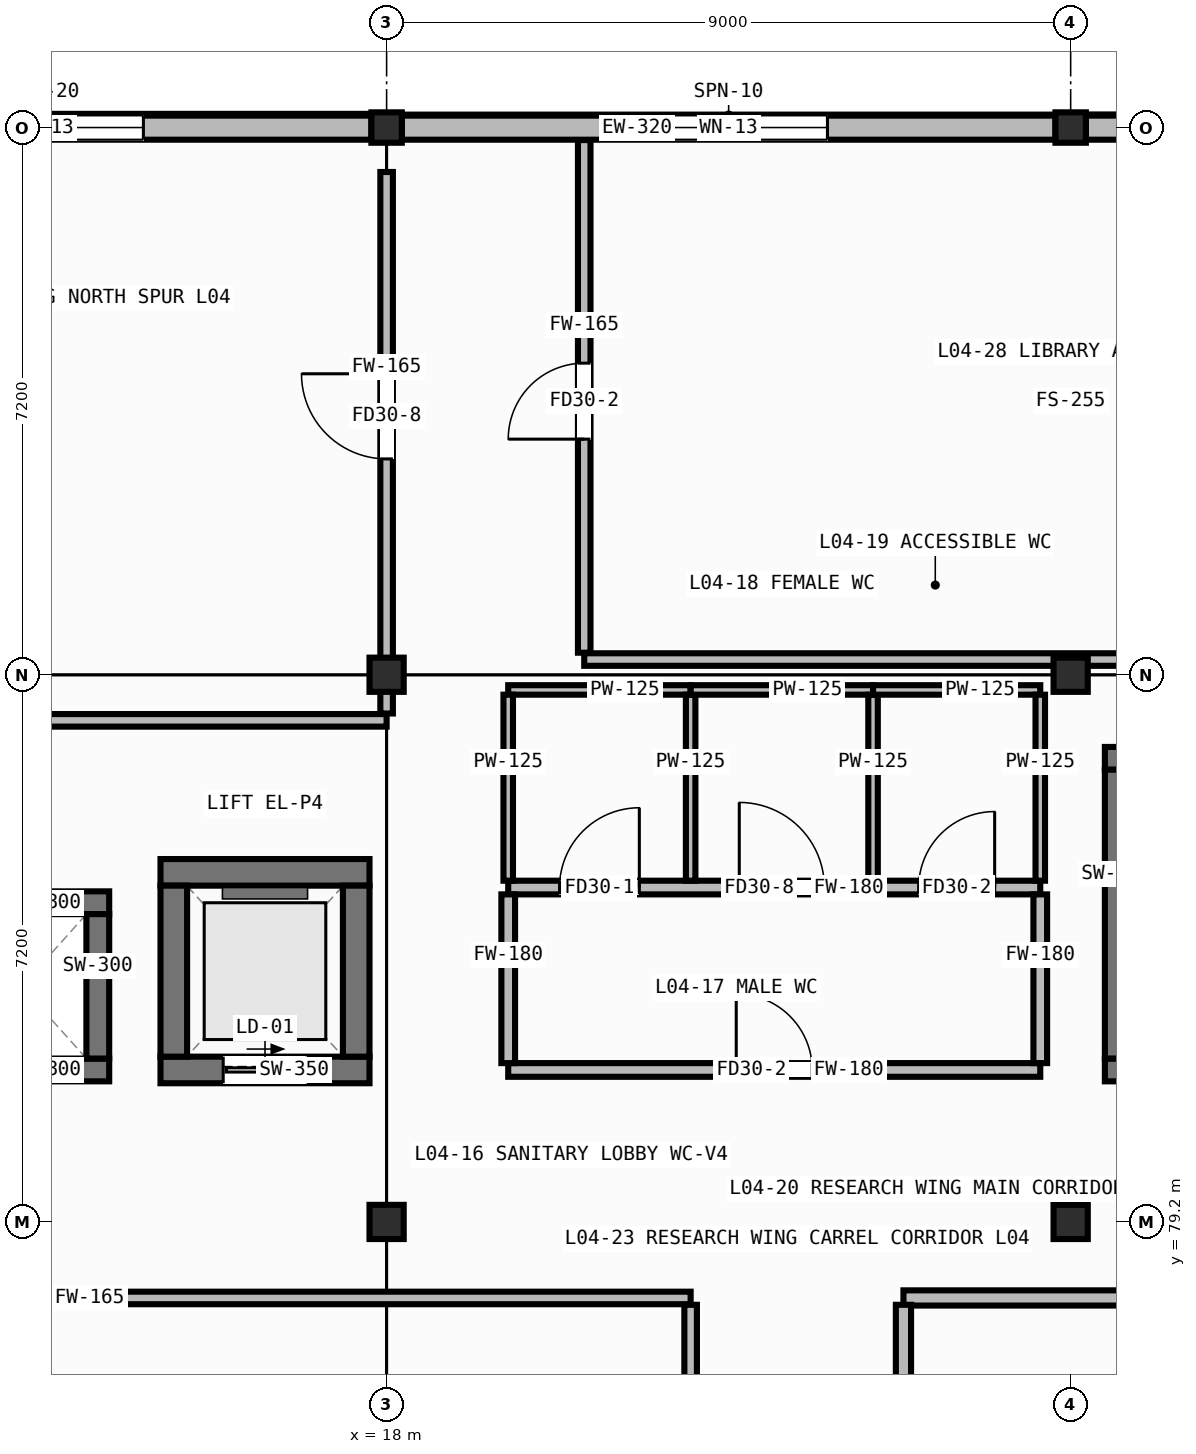
"""IFC4 building model, lengths in metres.
Left out: names, types, materials, properties, quantities, classifications, styles, units other than length and angle.
Written with IfcOpenShell. Run it as: python <this file> out.ifc"""

import sys

from ifc_helpers import new_model, si_unit, direction, frame, frame_2d, origin, origin_2d, place, context, subcontext, project, spatial, rectangle, hollow_rectangle, extrude, element, fill, save


model = new_model("IFC4")
c1 = context("Model", 3, precision=1e-05, world=origin(), true_north=direction((0.0, 1.0)))
c2 = subcontext(c1, "Body", "Model", "MODEL_VIEW")
j1 = project(units=[si_unit("LENGTHUNIT", "METRE"), si_unit("PLANEANGLEUNIT", "RADIAN")], contexts=[c1])
p1 = place(None, origin())
s1 = spatial("IfcSite", under=j1, at=p1, CompositionType="ELEMENT")
p2 = place(p1, origin())
s2 = spatial("IfcBuilding", under=s1, at=p2, CompositionType="ELEMENT")
p3 = place(p2, frame((0.0, 0.0, 12.8)))
s3 = spatial("IfcBuildingStorey", under=s2, at=p3, CompositionType="ELEMENT", Elevation=12.8)
for number, where, z_axis, x_axis in (
    (1, (18.0, 79.2, 0.0), (0.0, 0.0, 1.0), (1.0, 0.0, 0.0)),
    (2, (18.0, 86.4, 0.0), (0.0, 0.0, 1.0), (1.0, 0.0, 0.0)),
):
    element("IfcColumn", number, at=place(p3, frame(where, z_axis=z_axis, x_axis=x_axis)), inside=s3, PredefinedType="COLUMN", context=c2, shape_type="SweptSolid", body=[
        extrude(hollow_rectangle(XDim=0.45, YDim=0.45, WallThickness=0.019, at=origin_2d()), origin(), (0.0, 0.0, 1.0), 4.2),
    ])
p4 = place(p3, frame((18.0, 93.6, 0.0), z_axis=(0.0, 0.0, 1.0), x_axis=(1.0, 0.0, 0.0)))
e3 = element("IfcColumn", 3, at=p4, inside=s3, PredefinedType="COLUMN", context=c2, shape_type="SweptSolid", body=[
    extrude(hollow_rectangle(XDim=0.4, YDim=0.4, WallThickness=0.016, at=origin_2d()), origin(), (0.0, 0.0, 1.0), 4.2),
])
for number, where, z_axis, x_axis in (
    (4, (27.0, 79.2, 0.0), (0.0, 0.0, 1.0), (1.0, 0.0, 0.0)),
    (5, (27.0, 86.4, 0.0), (0.0, 0.0, 1.0), (1.0, 0.0, 0.0)),
):
    element("IfcColumn", number, at=place(p3, frame(where, z_axis=z_axis, x_axis=x_axis)), inside=s3, PredefinedType="COLUMN", context=c2, shape_type="SweptSolid", body=[
        extrude(hollow_rectangle(XDim=0.45, YDim=0.45, WallThickness=0.019, at=origin_2d()), origin(), (0.0, 0.0, 1.0), 4.2),
    ])
p5 = place(p3, frame((27.0, 93.6, 0.0), z_axis=(0.0, 0.0, 1.0), x_axis=(1.0, 0.0, 0.0)))
e6 = element("IfcColumn", 6, at=p5, inside=s3, PredefinedType="COLUMN", context=c2, shape_type="SweptSolid", body=[
    extrude(hollow_rectangle(XDim=0.4, YDim=0.4, WallThickness=0.016, at=origin_2d()), origin(), (0.0, 0.0, 1.0), 4.2),
])
p6 = place(p3, frame((17.8, 93.6, 0.0), z_axis=(0.0, 0.0, 1.0), x_axis=(-1.0, 0.0, 0.0)))
e7 = element("IfcWall", 7, at=p6, inside=s3, PredefinedType="STANDARD", context=c2, shape_type="SweptSolid", body=[
    extrude(rectangle(XDim=8.6, YDim=0.32, at=frame_2d((4.3, 0.0))), origin(), (0.0, 0.0, 1.0), 3.49),
])
p7 = place(p6, frame((3.0, 0.0, 0.85)))
e8 = element("IfcOpeningElement", 8, at=p7, cuts=e7, PredefinedType="OPENING", context=c2, shape_type="SweptSolid", body=[
    extrude(rectangle(XDim=2.6, YDim=1.6, at=frame_2d((1.3, 0.8))), frame((0.0, 0.172, 0.0), z_axis=(0.0, -1.0, 0.0), x_axis=(1.0, 0.0, 0.0)), (0.0, 0.0, 1.0), 0.344),
])
p8 = place(p3, frame((26.8, 93.6, 0.0), z_axis=(0.0, 0.0, 1.0), x_axis=(-1.0, 0.0, 0.0)))
e9 = element("IfcWall", 9, at=p8, inside=s3, PredefinedType="STANDARD", context=c2, shape_type="SweptSolid", body=[
    extrude(rectangle(XDim=8.6, YDim=0.32, at=frame_2d((4.3, 0.0))), origin(), (0.0, 0.0, 1.0), 3.49),
])
p9 = place(p8, frame((3.0, 0.0, 0.85)))
e10 = element("IfcOpeningElement", 10, at=p9, cuts=e9, PredefinedType="OPENING", context=c2, shape_type="SweptSolid", body=[
    extrude(rectangle(XDim=2.6, YDim=1.6, at=frame_2d((1.3, 0.8))), frame((0.0, 0.172, 0.0), z_axis=(0.0, -1.0, 0.0), x_axis=(1.0, 0.0, 0.0)), (0.0, 0.0, 1.0), 0.344),
])
p10 = place(p3, frame((35.8, 93.6, 0.0), z_axis=(0.0, 0.0, 1.0), x_axis=(-1.0, 0.0, 0.0)))
e11 = element("IfcWall", 11, at=p10, inside=s3, PredefinedType="STANDARD", context=c2, shape_type="SweptSolid", body=[
    extrude(rectangle(XDim=8.6, YDim=0.32, at=frame_2d((4.3, 0.0))), origin(), (0.0, 0.0, 1.0), 3.49),
])
p11 = place(p10, frame((3.0, 0.0, 0.85)))
e12 = element("IfcOpeningElement", 12, at=p11, cuts=e11, PredefinedType="OPENING", context=c2, shape_type="SweptSolid", body=[
    extrude(rectangle(XDim=2.6, YDim=1.6, at=frame_2d((1.3, 0.8))), frame((0.0, 0.172, 0.0), z_axis=(0.0, -1.0, 0.0), x_axis=(1.0, 0.0, 0.0)), (0.0, 0.0, 1.0), 0.344),
])
p12 = place(p3, frame((27.45, 81.2, 0.0), z_axis=(0.0, 0.0, 1.0), x_axis=(1.0, 0.0, 0.0)))
e13 = element("IfcWall", 13, at=p12, inside=s3, PredefinedType="SHEAR", context=c2, shape_type="SweptSolid", body=[
    extrude(rectangle(XDim=8.1, YDim=0.3, at=frame_2d((4.05, 0.0))), origin(), (0.0, 0.0, 1.0), 3.94),
])
p13 = place(p12, frame((0.5, 0.0, 0.0)))
e14 = element("IfcOpeningElement", 14, at=p13, cuts=e13, PredefinedType="OPENING", context=c2, shape_type="SweptSolid", body=[
    extrude(rectangle(XDim=1.2, YDim=2.1, at=frame_2d((0.6, 1.05))), frame((0.0, 0.162, 0.0), z_axis=(0.0, -1.0, 0.0), x_axis=(1.0, 0.0, 0.0)), (0.0, 0.0, 1.0), 0.324),
])
p14 = place(p3, frame((27.45, 85.3, 0.0), z_axis=(0.0, 0.0, 1.0), x_axis=(1.0, 0.0, 0.0)))
e15 = element("IfcWall", 15, at=p14, inside=s3, PredefinedType="SHEAR", context=c2, shape_type="SweptSolid", body=[
    extrude(rectangle(XDim=8.1, YDim=0.3, at=frame_2d((4.05, 0.0))), origin(), (0.0, 0.0, 1.0), 3.94),
])
p15 = place(p3, frame((27.6, 81.35, 0.0), z_axis=(0.0, 0.0, 1.0), x_axis=(0.0, 1.0, 0.0)))
e16 = element("IfcWall", 16, at=p15, inside=s3, PredefinedType="SHEAR", context=c2, shape_type="SweptSolid", body=[
    extrude(rectangle(XDim=3.8, YDim=0.3, at=frame_2d((1.9, 0.0))), origin(), (0.0, 0.0, 1.0), 3.94),
])
p16 = place(p3, frame((15.025, 81.2, 0.0), z_axis=(0.0, 0.0, 1.0), x_axis=(1.0, 0.0, 0.0)))
e17 = element("IfcWall", 17, at=p16, inside=s3, PredefinedType="SHEAR", context=c2, shape_type="SweptSolid", body=[
    extrude(rectangle(XDim=2.75, YDim=0.35, at=frame_2d((1.375, 0.0))), origin(), (0.0, 0.0, 1.0), 3.94),
])
p17 = place(p16, frame((0.825, 0.0, 0.0)))
e18 = element("IfcOpeningElement", 18, at=p17, cuts=e17, PredefinedType="OPENING", context=c2, shape_type="SweptSolid", body=[
    extrude(rectangle(XDim=1.1, YDim=2.1, at=frame_2d((0.55, 1.05))), frame((0.0, 0.187, 0.0), z_axis=(0.0, -1.0, 0.0), x_axis=(1.0, 0.0, 0.0)), (0.0, 0.0, 1.0), 0.374),
])
p18 = place(p3, frame((15.025, 83.8, 0.0), z_axis=(0.0, 0.0, 1.0), x_axis=(1.0, 0.0, 0.0)))
e19 = element("IfcWall", 19, at=p18, inside=s3, PredefinedType="SHEAR", context=c2, shape_type="SweptSolid", body=[
    extrude(rectangle(XDim=2.75, YDim=0.35, at=frame_2d((1.375, 0.0))), origin(), (0.0, 0.0, 1.0), 3.94),
])
for number, where, z_axis, x_axis in (
    (20, (15.2, 81.375, 0.0), (0.0, 0.0, 1.0), (0.0, 1.0, 0.0)),
    (21, (17.6, 81.375, 0.0), (0.0, 0.0, 1.0), (0.0, 1.0, 0.0)),
):
    element("IfcWall", number, at=place(p3, frame(where, z_axis=z_axis, x_axis=x_axis)), inside=s3, PredefinedType="SHEAR", context=c2, shape_type="SweptSolid", body=[
        extrude(rectangle(XDim=2.25, YDim=0.35, at=frame_2d((1.125, 0.0))), origin(), (0.0, 0.0, 1.0), 3.94),
    ])
for number, where, z_axis, x_axis in (
    (22, (12.05, 81.2, 0.0), (0.0, 0.0, 1.0), (1.0, 0.0, 0.0)),
    (23, (12.05, 83.4, 0.0), (0.0, 0.0, 1.0), (1.0, 0.0, 0.0)),
):
    element("IfcWall", number, at=place(p3, frame(where, z_axis=z_axis, x_axis=x_axis)), inside=s3, PredefinedType="SHEAR", context=c2, shape_type="SweptSolid", body=[
        extrude(rectangle(XDim=2.3, YDim=0.3, at=frame_2d((1.15, 0.0))), origin(), (0.0, 0.0, 1.0), 3.94),
    ])
p19 = place(p3, frame((14.2, 81.35, 0.0), z_axis=(0.0, 0.0, 1.0), x_axis=(0.0, 1.0, 0.0)))
e24 = element("IfcWall", 24, at=p19, inside=s3, PredefinedType="SHEAR", context=c2, shape_type="SweptSolid", body=[
    extrude(rectangle(XDim=1.9, YDim=0.3, at=frame_2d((0.95, 0.0))), origin(), (0.0, 0.0, 1.0), 3.94),
])
p20 = place(p3, frame((19.6, 81.2, 0.0), z_axis=(0.0, 0.0, 1.0), x_axis=(1.0, 0.0, 0.0)))
e25 = element("IfcWall", 25, at=p20, inside=s3, PredefinedType="PARTITIONING", context=c2, shape_type="SweptSolid", body=[
    extrude(rectangle(XDim=7.0, YDim=0.18, at=frame_2d((3.5, 0.0))), origin(), (0.0, 0.0, 1.0), 3.94),
])
p21 = place(p20, frame((3.0, 0.0, 0.0)))
e26 = element("IfcOpeningElement", 26, at=p21, cuts=e25, PredefinedType="OPENING", context=c2, shape_type="SweptSolid", body=[
    extrude(rectangle(XDim=1.0, YDim=2.08, at=frame_2d((0.5, 1.04))), frame((0.0, 0.102, 0.0), z_axis=(0.0, -1.0, 0.0), x_axis=(1.0, 0.0, 0.0)), (0.0, 0.0, 1.0), 0.204),
])
p22 = place(p3, frame((19.6, 83.6, 0.0), z_axis=(0.0, 0.0, 1.0), x_axis=(1.0, 0.0, 0.0)))
e27 = element("IfcWall", 27, at=p22, inside=s3, PredefinedType="PARTITIONING", context=c2, shape_type="SweptSolid", body=[
    extrude(rectangle(XDim=7.0, YDim=0.18, at=frame_2d((3.5, 0.0))), origin(), (0.0, 0.0, 1.0), 3.94),
])
p23 = place(p22, frame((0.675, 0.0, 0.0)))
e28 = element("IfcOpeningElement", 28, at=p23, cuts=e27, PredefinedType="OPENING", context=c2, shape_type="SweptSolid", body=[
    extrude(rectangle(XDim=1.05, YDim=2.1, at=frame_2d((0.525, 1.05))), frame((0.0, 0.102, 0.0), z_axis=(0.0, -1.0, 0.0), x_axis=(1.0, 0.0, 0.0)), (0.0, 0.0, 1.0), 0.204),
])
p24 = place(p22, frame((3.04, 0.0, 0.0)))
e29 = element("IfcOpeningElement", 29, at=p24, cuts=e27, PredefinedType="OPENING", context=c2, shape_type="SweptSolid", body=[
    extrude(rectangle(XDim=1.12, YDim=2.08, at=frame_2d((0.56, 1.04))), frame((0.0, 0.102, 0.0), z_axis=(0.0, -1.0, 0.0), x_axis=(1.0, 0.0, 0.0)), (0.0, 0.0, 1.0), 0.204),
])
p25 = place(p22, frame((5.4, 0.0, 0.0)))
e30 = element("IfcOpeningElement", 30, at=p25, cuts=e27, PredefinedType="OPENING", context=c2, shape_type="SweptSolid", body=[
    extrude(rectangle(XDim=1.0, YDim=2.08, at=frame_2d((0.5, 1.04))), frame((0.0, 0.102, 0.0), z_axis=(0.0, -1.0, 0.0), x_axis=(1.0, 0.0, 0.0)), (0.0, 0.0, 1.0), 0.204),
])
for number, where, z_axis, x_axis in (
    (31, (19.6, 81.29, 0.0), (0.0, 0.0, 1.0), (0.0, 1.0, 0.0)),
    (32, (26.6, 81.29, 0.0), (0.0, 0.0, 1.0), (0.0, 1.0, 0.0)),
):
    element("IfcWall", number, at=place(p3, frame(where, z_axis=z_axis, x_axis=x_axis)), inside=s3, PredefinedType="PARTITIONING", context=c2, shape_type="SweptSolid", body=[
        extrude(rectangle(XDim=2.22, YDim=0.18, at=frame_2d((1.11, 0.0))), origin(), (0.0, 0.0, 1.0), 3.94),
    ])
p26 = place(p3, frame((19.6, 86.2, 0.0), z_axis=(0.0, 0.0, 1.0), x_axis=(1.0, 0.0, 0.0)))
e33 = element("IfcWall", 33, at=p26, inside=s3, PredefinedType="PARTITIONING", context=c2, shape_type="SweptSolid", body=[
    extrude(rectangle(XDim=2.4, YDim=0.125, at=frame_2d((1.2, 0.0))), origin(), (0.0, 0.0, 1.0), 3.22),
])
for number, where, z_axis, x_axis in (
    (34, (19.6, 83.69, 0.0), (0.0, 0.0, 1.0), (0.0, 1.0, 0.0)),
    (35, (22.0, 83.69, 0.0), (0.0, 0.0, 1.0), (0.0, 1.0, 0.0)),
):
    element("IfcWall", number, at=place(p3, frame(where, z_axis=z_axis, x_axis=x_axis)), inside=s3, PredefinedType="PARTITIONING", context=c2, shape_type="SweptSolid", body=[
        extrude(rectangle(XDim=2.448, YDim=0.125, at=frame_2d((1.224, 0.0))), origin(), (0.0, 0.0, 1.0), 3.94),
    ])
p27 = place(p3, frame((22.0, 86.2, 0.0), z_axis=(0.0, 0.0, 1.0), x_axis=(1.0, 0.0, 0.0)))
e36 = element("IfcWall", 36, at=p27, inside=s3, PredefinedType="PARTITIONING", context=c2, shape_type="SweptSolid", body=[
    extrude(rectangle(XDim=2.4, YDim=0.125, at=frame_2d((1.2, 0.0))), origin(), (0.0, 0.0, 1.0), 3.22),
])
p28 = place(p3, frame((24.4, 83.69, 0.0), z_axis=(0.0, 0.0, 1.0), x_axis=(0.0, 1.0, 0.0)))
e37 = element("IfcWall", 37, at=p28, inside=s3, PredefinedType="PARTITIONING", context=c2, shape_type="SweptSolid", body=[
    extrude(rectangle(XDim=2.448, YDim=0.125, at=frame_2d((1.224, 0.0))), origin(), (0.0, 0.0, 1.0), 3.94),
])
p29 = place(p3, frame((24.4, 86.2, 0.0), z_axis=(0.0, 0.0, 1.0), x_axis=(1.0, 0.0, 0.0)))
e38 = element("IfcWall", 38, at=p29, inside=s3, PredefinedType="PARTITIONING", context=c2, shape_type="SweptSolid", body=[
    extrude(rectangle(XDim=2.2, YDim=0.125, at=frame_2d((1.1, 0.0))), origin(), (0.0, 0.0, 1.0), 3.22),
])
p30 = place(p3, frame((26.6, 83.69, 0.0), z_axis=(0.0, 0.0, 1.0), x_axis=(0.0, 1.0, 0.0)))
e39 = element("IfcWall", 39, at=p30, inside=s3, PredefinedType="PARTITIONING", context=c2, shape_type="SweptSolid", body=[
    extrude(rectangle(XDim=2.448, YDim=0.125, at=frame_2d((1.224, 0.0))), origin(), (0.0, 0.0, 1.0), 3.94),
])
p31 = place(p3, frame((0.035, 78.2, 0.0), z_axis=(0.0, 0.0, 1.0), x_axis=(1.0, 0.0, 0.0)))
e40 = element("IfcWall", 40, at=p31, inside=s3, PredefinedType="PARTITIONING", context=c2, shape_type="SweptSolid", body=[
    extrude(rectangle(XDim=21.965, YDim=0.165, at=frame_2d((10.982, 0.0))), origin(), (0.0, 0.0, 1.0), 3.94),
])
p32 = place(p31, frame((3.615, 0.0, 0.0)))
e41 = element("IfcOpeningElement", 41, at=p32, cuts=e40, PredefinedType="OPENING", context=c2, shape_type="SweptSolid", body=[
    extrude(rectangle(XDim=1.7, YDim=2.12, at=frame_2d((0.85, 1.06))), frame((0.0, 0.094, 0.0), z_axis=(0.0, -1.0, 0.0), x_axis=(1.0, 0.0, 0.0)), (0.0, 0.0, 1.0), 0.189),
])
p33 = place(p3, frame((22.0, 64.835, 0.0), z_axis=(0.0, 0.0, 1.0), x_axis=(0.0, 1.0, 0.0)))
e42 = element("IfcWall", 42, at=p33, inside=s3, PredefinedType="PARTITIONING", context=c2, shape_type="SweptSolid", body=[
    extrude(rectangle(XDim=13.275, YDim=0.165, at=frame_2d((6.638, 0.0))), origin(), (0.0, 0.0, 1.0), 3.94),
])
p34 = place(p3, frame((24.8, 78.2, 0.0), z_axis=(0.0, 0.0, 1.0), x_axis=(1.0, 0.0, 0.0)))
e43 = element("IfcWall", 43, at=p34, inside=s3, PredefinedType="PARTITIONING", context=c2, shape_type="SweptSolid", body=[
    extrude(rectangle(XDim=11.165, YDim=0.2, at=frame_2d((5.583, 0.0))), origin(), (0.0, 0.0, 1.0), 3.94),
])
p35 = place(p34, frame((6.1, 0.0, 0.0)))
e44 = element("IfcOpeningElement", 44, at=p35, cuts=e43, PredefinedType="OPENING", context=c2, shape_type="SweptSolid", body=[
    extrude(rectangle(XDim=1.2, YDim=2.1, at=frame_2d((0.6, 1.05))), frame((0.0, 0.112, 0.0), z_axis=(0.0, -1.0, 0.0), x_axis=(1.0, 0.0, 0.0)), (0.0, 0.0, 1.0), 0.224),
])
p36 = place(p3, frame((24.8, 71.49, 0.0), z_axis=(0.0, 0.0, 1.0), x_axis=(0.0, 1.0, 0.0)))
e45 = element("IfcWall", 45, at=p36, inside=s3, PredefinedType="PARTITIONING", context=c2, shape_type="SweptSolid", body=[
    extrude(rectangle(XDim=6.62, YDim=0.2, at=frame_2d((3.31, 0.0))), origin(), (0.0, 0.0, 1.0), 3.94),
])
p37 = place(p3, frame((0.155, 85.8, 0.0), z_axis=(0.0, 0.0, 1.0), x_axis=(1.0, 0.0, 0.0)))
e46 = element("IfcWall", 46, at=p37, inside=s3, PredefinedType="PARTITIONING", context=c2, shape_type="SweptSolid", body=[
    extrude(rectangle(XDim=17.845, YDim=0.165, at=frame_2d((8.922, 0.0))), origin(), (0.0, 0.0, 1.0), 3.94),
])
p38 = place(p3, frame((18.0, 85.89, 0.0), z_axis=(0.0, 0.0, 1.0), x_axis=(0.0, 1.0, 0.0)))
e47 = element("IfcWall", 47, at=p38, inside=s3, PredefinedType="PARTITIONING", context=c2, shape_type="SweptSolid", body=[
    extrude(rectangle(XDim=7.125, YDim=0.165, at=frame_2d((3.562, 0.0))), origin(), (0.0, 0.0, 1.0), 3.22),
])
p39 = place(p38, frame((3.35, 0.0, 0.0)))
e48 = element("IfcOpeningElement", 48, at=p39, cuts=e47, PredefinedType="OPENING", context=c2, shape_type="SweptSolid", body=[
    extrude(rectangle(XDim=1.12, YDim=2.08, at=frame_2d((0.56, 1.04))), frame((0.0, 0.094, 0.0), z_axis=(0.0, -1.0, 0.0), x_axis=(1.0, 0.0, 0.0)), (0.0, 0.0, 1.0), 0.189),
])
p40 = place(p3, frame((20.6, 86.6, 0.0), z_axis=(0.0, 0.0, 1.0), x_axis=(1.0, 0.0, 0.0)))
e49 = element("IfcWall", 49, at=p40, inside=s3, PredefinedType="PARTITIONING", context=c2, shape_type="SweptSolid", body=[
    extrude(rectangle(XDim=14.945, YDim=0.165, at=frame_2d((7.472, 0.0))), origin(), (0.0, 0.0, 1.0), 3.22),
])
p41 = place(p3, frame((20.6, 86.69, 0.0), z_axis=(0.0, 0.0, 1.0), x_axis=(0.0, 1.0, 0.0)))
e50 = element("IfcWall", 50, at=p41, inside=s3, PredefinedType="PARTITIONING", context=c2, shape_type="SweptSolid", body=[
    extrude(rectangle(XDim=6.745, YDim=0.165, at=frame_2d((3.373, 0.0))), origin(), (0.0, 0.0, 1.0), 3.94),
])
p42 = place(p41, frame((2.81, 0.0, 0.0)))
e51 = element("IfcOpeningElement", 51, at=p42, cuts=e50, PredefinedType="OPENING", context=c2, shape_type="SweptSolid", body=[
    extrude(rectangle(XDim=1.0, YDim=2.08, at=frame_2d((0.5, 1.04))), frame((0.0, 0.094, 0.0), z_axis=(0.0, -1.0, 0.0), x_axis=(1.0, 0.0, 0.0)), (0.0, 0.0, 1.0), 0.189),
])
p43 = place(p7, origin())
e52 = element("IfcWindow", 52, at=p43, inside=s3, PartitioningType="DOUBLE_PANEL_VERTICAL", PredefinedType="WINDOW", context=c2, shape_type="SweptSolid", body=[
    extrude(rectangle(XDim=2.6, YDim=1.6, at=frame_2d((1.3, 0.8))), frame((0.0, 0.03, 0.0), z_axis=(0.0, -1.0, 0.0), x_axis=(1.0, 0.0, 0.0)), (0.0, 0.0, 1.0), 0.06),
])
fill(e8, e52)
p44 = place(p9, origin())
e53 = element("IfcWindow", 53, at=p44, inside=s3, PartitioningType="DOUBLE_PANEL_VERTICAL", PredefinedType="WINDOW", context=c2, shape_type="SweptSolid", body=[
    extrude(rectangle(XDim=2.6, YDim=1.6, at=frame_2d((1.3, 0.8))), frame((0.0, 0.03, 0.0), z_axis=(0.0, -1.0, 0.0), x_axis=(1.0, 0.0, 0.0)), (0.0, 0.0, 1.0), 0.06),
])
fill(e10, e53)
p45 = place(p17, origin())
e54 = element("IfcDoor", 54, at=p45, inside=s3, OperationType="SLIDING_TO_LEFT", PredefinedType="DOOR", context=c2, shape_type="SweptSolid", body=[
    extrude(rectangle(XDim=1.1, YDim=2.1, at=frame_2d((0.55, 1.05))), frame((0.0, 0.025, 0.0), z_axis=(0.0, -1.0, 0.0), x_axis=(1.0, 0.0, 0.0)), (0.0, 0.0, 1.0), 0.05),
])
fill(e18, e54)
p46 = place(p21, origin())
e55 = element("IfcDoor", 55, at=p46, inside=s3, OperationType="SINGLE_SWING_LEFT", PredefinedType="DOOR", context=c2, shape_type="SweptSolid", body=[
    extrude(rectangle(XDim=1.0, YDim=2.08, at=frame_2d((0.5, 1.04))), frame((0.0, 0.025, 0.0), z_axis=(0.0, -1.0, 0.0), x_axis=(1.0, 0.0, 0.0)), (0.0, 0.0, 1.0), 0.05),
])
fill(e26, e55)
p47 = place(p23, origin())
e56 = element("IfcDoor", 56, at=p47, inside=s3, OperationType="SINGLE_SWING_RIGHT", PredefinedType="DOOR", context=c2, shape_type="SweptSolid", body=[
    extrude(rectangle(XDim=1.05, YDim=2.1, at=frame_2d((0.525, 1.05))), frame((0.0, 0.025, 0.0), z_axis=(0.0, -1.0, 0.0), x_axis=(1.0, 0.0, 0.0)), (0.0, 0.0, 1.0), 0.05),
])
fill(e28, e56)
p48 = place(p24, origin())
e57 = element("IfcDoor", 57, at=p48, inside=s3, OperationType="SINGLE_SWING_LEFT", PredefinedType="DOOR", context=c2, shape_type="SweptSolid", body=[
    extrude(rectangle(XDim=1.12, YDim=2.08, at=frame_2d((0.56, 1.04))), frame((0.0, 0.025, 0.0), z_axis=(0.0, -1.0, 0.0), x_axis=(1.0, 0.0, 0.0)), (0.0, 0.0, 1.0), 0.05),
])
fill(e29, e57)
p49 = place(p25, origin())
e58 = element("IfcDoor", 58, at=p49, inside=s3, OperationType="SINGLE_SWING_RIGHT", PredefinedType="DOOR", context=c2, shape_type="SweptSolid", body=[
    extrude(rectangle(XDim=1.0, YDim=2.08, at=frame_2d((0.5, 1.04))), frame((0.0, 0.025, 0.0), z_axis=(0.0, -1.0, 0.0), x_axis=(1.0, 0.0, 0.0)), (0.0, 0.0, 1.0), 0.05),
])
fill(e30, e58)
p50 = place(p39, origin())
e59 = element("IfcDoor", 59, at=p50, inside=s3, OperationType="SINGLE_SWING_RIGHT", PredefinedType="DOOR", context=c2, shape_type="SweptSolid", body=[
    extrude(rectangle(XDim=1.12, YDim=2.08, at=frame_2d((0.56, 1.04))), frame((0.0, 0.025, 0.0), z_axis=(0.0, -1.0, 0.0), x_axis=(1.0, 0.0, 0.0)), (0.0, 0.0, 1.0), 0.05),
])
fill(e48, e59)
p51 = place(p42, origin())
e60 = element("IfcDoor", 60, at=p51, inside=s3, OperationType="SINGLE_SWING_LEFT", PredefinedType="DOOR", context=c2, shape_type="SweptSolid", body=[
    extrude(rectangle(XDim=1.0, YDim=2.08, at=frame_2d((0.5, 1.04))), frame((0.0, 0.025, 0.0), z_axis=(0.0, -1.0, 0.0), x_axis=(1.0, 0.0, 0.0)), (0.0, 0.0, 1.0), 0.05),
])
fill(e51, e60)
save(model, sys.argv[1])
